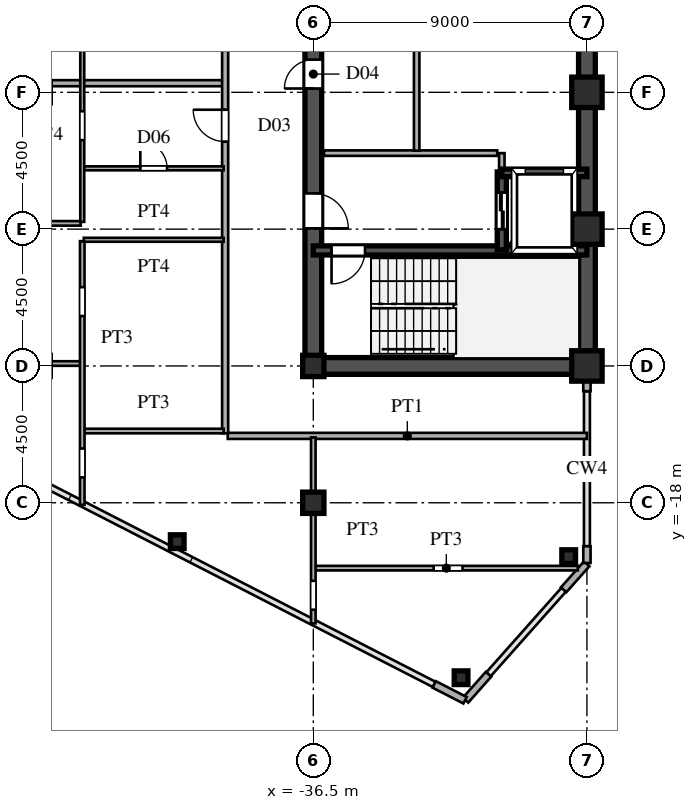
"""IFC4 building model, lengths in metres.
Left out: names, types, materials, properties, quantities, classifications, styles, units other than length and angle.
Written with IfcOpenShell. Run it as: python <this file> out.ifc"""

import sys

from ifc_helpers import new_model, si_unit, direction, frame, frame_2d, origin, origin_2d, place, context, subcontext, project, spatial, rectangle, hollow_rectangle, i_section, extrude, source, transform, mapped, element, fill, save


model = new_model("IFC4")
c1 = context("Model", 3, precision=1e-05, world=origin(), true_north=direction((0.0, 1.0)))
c2 = subcontext(c1, "Body", "Model", "MODEL_VIEW")
j1 = project(units=[si_unit("LENGTHUNIT", "METRE"), si_unit("PLANEANGLEUNIT", "RADIAN")], contexts=[c1])
p1 = place(None, origin())
s1 = spatial("IfcSite", under=j1, at=p1, CompositionType="ELEMENT")
p2 = place(p1, origin())
s2 = spatial("IfcBuilding", under=s1, at=p2, CompositionType="ELEMENT")
p3 = place(p2, frame((0.0, 0.0, 154.8)))
s3 = spatial("IfcBuildingStorey", under=s2, at=p3, CompositionType="ELEMENT", Elevation=154.8)
m1 = source(origin(), c2, "Body", "SweptSolid", [
    extrude(hollow_rectangle(XDim=1.0, YDim=1.0, WallThickness=0.042, at=origin_2d()), origin(), (0.0, 0.0, 1.0), 3.6),
])
for number, where, z_axis, x_axis in (
    (1, (-27.5, -13.5, 0.0), (0.0, 0.0, 1.0), (1.0, 0.0, 0.0)),
    (2, (-27.5, -9.0, 0.0), (0.0, 0.0, 1.0), (1.0, 0.0, 0.0)),
    (3, (-27.5, -4.5, 0.0), (0.0, 0.0, 1.0), (1.0, 0.0, 0.0)),
):
    element("IfcColumn", number, at=place(p3, frame(where, z_axis=z_axis, x_axis=x_axis)), inside=s3, PredefinedType="COLUMN", context=c2, shape_type="MappedRepresentation", body=[
        mapped(m1, transform((0.0, 0.0, 0.0), scale=1.0)),
    ])
m2 = source(origin(), c2, "Body", "SweptSolid", [
    extrude(i_section(OverallWidth=0.7, OverallDepth=0.7, WebThickness=0.028, FlangeThickness=0.045, at=origin_2d()), origin(), (0.0, 0.0, 1.0), 3.6),
])
for number, where, z_axis, x_axis in (
    (4, (-36.5, -18.0, 0.0), (0.0, 0.0, 1.0), (1.0, 0.0, 0.0)),
    (5, (-36.5, -13.5, 0.0), (0.0, 0.0, 1.0), (1.0, 0.0, 0.0)),
):
    element("IfcColumn", number, at=place(p3, frame(where, z_axis=z_axis, x_axis=x_axis)), inside=s3, PredefinedType="COLUMN", context=c2, shape_type="MappedRepresentation", body=[
        mapped(m2, transform((0.0, 0.0, 0.0), scale=1.0)),
    ])
m3 = source(origin(), c2, "Body", "SweptSolid", [
    extrude(hollow_rectangle(XDim=0.45, YDim=0.45, WallThickness=0.018, at=origin_2d()), origin(), (0.0, 0.0, 1.0), 3.6),
])
for number, where, z_axis, x_axis in (
    (6, (-28.1, -19.772, 0.0), (0.0, 0.0, 1.0), (1.0, 0.0, 0.0)),
    (7, (-31.64, -23.754, 0.0), (0.0, 0.0, 1.0), (1.0, 0.0, 0.0)),
    (8, (-40.976, -19.278, 0.0), (0.0, 0.0, 1.0), (1.0, 0.0, 0.0)),
):
    element("IfcColumn", number, at=place(p3, frame(where, z_axis=z_axis, x_axis=x_axis)), inside=s3, PredefinedType="COLUMN", context=c2, shape_type="MappedRepresentation", body=[
        mapped(m3, transform((0.0, 0.0, 0.0), scale=1.0)),
    ])
p4 = place(p3, frame((-27.5, -19.98, 0.0), z_axis=(0.0, 0.0, 1.0), x_axis=(0.0, 1.0, 0.0)))
e9 = element("IfcWall", 9, at=p4, inside=s3, PredefinedType="SOLIDWALL", context=c2, shape_type="SweptSolid", body=[
    extrude(rectangle(XDim=0.55, YDim=0.24, at=frame_2d((0.275, 0.0))), origin(), (0.0, 0.0, 1.0), 3.38),
])
p5 = place(p3, frame((-27.5, -14.33, 0.0), z_axis=(0.0, 0.0, 1.0), x_axis=(0.0, 1.0, 0.0)))
e10 = element("IfcWall", 10, at=p5, inside=s3, PredefinedType="SOLIDWALL", context=c2, shape_type="SweptSolid", body=[
    extrude(rectangle(XDim=0.55, YDim=0.24, at=frame_2d((0.275, 0.0))), origin(), (0.0, 0.0, 1.0), 1.88),
])
p6 = place(p3, frame((-32.523, -23.975, 0.0), z_axis=(0.0, 0.0, 1.0), x_axis=(0.889797395748, -0.456355776255, 0.0)))
e11 = element("IfcWall", 11, at=p6, inside=s3, PredefinedType="SOLIDWALL", context=c2, shape_type="SweptSolid", body=[
    extrude(rectangle(XDim=1.14, YDim=0.24, at=frame_2d((0.57, 0.0))), origin(), (0.0, 0.0, 1.0), 3.38),
])
for number, where, z_axis, x_axis in (
    (12, (-31.493, -24.492, 0.0), (0.0, 0.0, 1.0), (0.664, 0.747, 0.0)),
    (13, (-28.264, -20.86, 0.0), (0.0, 0.0, 1.0), (0.664, 0.747, 0.0)),
):
    element("IfcWall", number, at=place(p3, frame(where, z_axis=z_axis, x_axis=x_axis)), inside=s3, PredefinedType="SOLIDWALL", context=c2, shape_type="SweptSolid", body=[
        extrude(rectangle(XDim=1.14, YDim=0.24, at=frame_2d((0.57, 0.0))), origin(), (0.0, 0.0, 1.0), 3.38),
    ])
p7 = place(p3, frame((-27.5, -13.5, 0.0), z_axis=(0.0, 0.0, 1.0), x_axis=(0.0, 1.0, 0.0)))
e14 = element("IfcWall", 14, at=p7, inside=s3, PredefinedType="SHEAR", context=c2, shape_type="SweptSolid", body=[
    extrude(rectangle(XDim=12.2, YDim=0.55, at=frame_2d((6.1, 0.0))), origin(), (0.0, 0.0, 1.0), 3.38),
])
p8 = place(p3, frame((-36.5, -13.5, 0.0), z_axis=(0.0, 0.0, 1.0), x_axis=(1.0, 0.0, 0.0)))
e15 = element("IfcWall", 15, at=p8, inside=s3, PredefinedType="SHEAR", context=c2, shape_type="SweptSolid", body=[
    extrude(rectangle(XDim=9.0, YDim=0.55, at=frame_2d((4.5, 0.0))), origin(), (0.0, 0.0, 1.0), 3.38),
])
p9 = place(p3, frame((-36.5, -13.65, 0.0), z_axis=(0.0, 0.0, 1.0), x_axis=(0.0, 1.0, 0.0)))
e16 = element("IfcWall", 16, at=p9, inside=s3, PredefinedType="SHEAR", context=c2, shape_type="SweptSolid", body=[
    extrude(rectangle(XDim=7.15, YDim=0.55, at=frame_2d((3.575, 0.0))), origin(), (0.0, 0.0, 1.0), 3.38),
])
p10 = place(p9, frame((4.675, 0.0, 0.0)))
e17 = element("IfcOpeningElement", 17, at=p10, cuts=e16, PredefinedType="OPENING", context=c2, shape_type="SweptSolid", body=[
    extrude(rectangle(XDim=1.15, YDim=2.2, at=frame_2d((0.575, 1.1))), frame((0.0, 0.285, 0.0), z_axis=(0.0, -1.0, 0.0), x_axis=(1.0, 0.0, 0.0)), (0.0, 0.0, 1.0), 0.57),
])
p11 = place(p3, frame((-36.5, -6.5, 0.0), z_axis=(0.0, 0.0, 1.0), x_axis=(0.0, 1.0, 0.0)))
e18 = element("IfcWall", 18, at=p11, inside=s3, PredefinedType="SHEAR", context=c2, shape_type="SweptSolid", body=[
    extrude(rectangle(XDim=5.2, YDim=0.55, at=frame_2d((2.6, 0.0))), origin(), (0.0, 0.0, 1.0), 3.38),
])
p12 = place(p11, frame((2.125, 0.0, 0.0)))
e19 = element("IfcOpeningElement", 19, at=p12, cuts=e18, PredefinedType="OPENING", context=c2, shape_type="SweptSolid", body=[
    extrude(rectangle(XDim=0.95, YDim=2.15, at=frame_2d((0.475, 1.075))), frame((0.0, 0.285, 0.0), z_axis=(0.0, -1.0, 0.0), x_axis=(1.0, 0.0, 0.0)), (0.0, 0.0, 1.0), 0.57),
])
p13 = place(p3, frame((-36.5, -9.7, 0.0), z_axis=(0.0, 0.0, 1.0), x_axis=(1.0, 0.0, 0.0)))
e20 = element("IfcWall", 20, at=p13, inside=s3, PredefinedType="SHEAR", context=c2, shape_type="SweptSolid", body=[
    extrude(rectangle(XDim=9.0, YDim=0.3, at=frame_2d((4.5, 0.0))), origin(), (0.0, 0.0, 1.0), 3.38),
])
p14 = place(p13, frame((0.6, 0.0, 0.0)))
e21 = element("IfcOpeningElement", 21, at=p14, cuts=e20, PredefinedType="OPENING", context=c2, shape_type="SweptSolid", body=[
    extrude(rectangle(XDim=1.1, YDim=2.2, at=frame_2d((0.55, 1.1))), frame((0.0, 0.16, 0.0), z_axis=(0.0, -1.0, 0.0), x_axis=(1.0, 0.0, 0.0)), (0.0, 0.0, 1.0), 0.32),
])
p15 = place(p3, frame((-30.3, -7.15, 0.0), z_axis=(0.0, 0.0, 1.0), x_axis=(1.0, 0.0, 0.0)))
e22 = element("IfcWall", 22, at=p15, inside=s3, PredefinedType="SHEAR", context=c2, shape_type="SweptSolid", body=[
    extrude(rectangle(XDim=2.8, YDim=0.25, at=frame_2d((1.4, 0.0))), origin(), (0.0, 0.0, 1.0), 3.38),
])
p16 = place(p3, frame((-30.3, -9.68, 0.0), z_axis=(0.0, 0.0, 1.0), x_axis=(0.0, 1.0, 0.0)))
e23 = element("IfcWall", 23, at=p16, inside=s3, PredefinedType="SHEAR", context=c2, shape_type="SweptSolid", body=[
    extrude(rectangle(XDim=2.56, YDim=0.3, at=frame_2d((1.28, 0.0))), origin(), (0.0, 0.0, 1.0), 3.38),
])
p17 = place(p16, frame((0.68, 0.0, 0.0)))
e24 = element("IfcOpeningElement", 24, at=p17, cuts=e23, PredefinedType="OPENING", context=c2, shape_type="SweptSolid", body=[
    extrude(rectangle(XDim=1.2, YDim=2.25, at=frame_2d((0.6, 1.125))), frame((0.0, 0.16, 0.0), z_axis=(0.0, -1.0, 0.0), x_axis=(1.0, 0.0, 0.0)), (0.0, 0.0, 1.0), 0.32),
])
p18 = place(p3, frame((-36.15, -6.5, 0.0), z_axis=(0.0, 0.0, 1.0), x_axis=(1.0, 0.0, 0.0)))
e25 = element("IfcWall", 25, at=p18, inside=s3, PredefinedType="PARTITIONING", context=c2, shape_type="SweptSolid", body=[
    extrude(rectangle(XDim=5.7, YDim=0.18, at=frame_2d((2.85, 0.0))), origin(), (0.0, 0.0, 1.0), 3.38),
])
p19 = place(p3, frame((-30.3, -7.12, 0.0), z_axis=(0.0, 0.0, 1.0), x_axis=(0.0, 1.0, 0.0)))
e26 = element("IfcWall", 26, at=p19, inside=s3, PredefinedType="PARTITIONING", context=c2, shape_type="SweptSolid", body=[
    extrude(rectangle(XDim=0.62, YDim=0.18, at=frame_2d((0.31, 0.0))), origin(), (0.0, 0.0, 1.0), 3.38),
])
p20 = place(p3, frame((-33.1, -6.42, 0.0), z_axis=(0.0, 0.0, 1.0), x_axis=(0.0, 1.0, 0.0)))
e27 = element("IfcWall", 27, at=p20, inside=s3, PredefinedType="PARTITIONING", context=c2, shape_type="SweptSolid", body=[
    extrude(rectangle(XDim=5.04, YDim=0.18, at=frame_2d((2.52, 0.0))), origin(), (0.0, 0.0, 1.0), 3.38),
])
p21 = place(p3, frame((-36.45, -20.15, 0.0), z_axis=(0.0, 0.0, 1.0), x_axis=(1.0, 0.0, 0.0)))
e28 = element("IfcWall", 28, at=p21, inside=s3, PredefinedType="PARTITIONING", context=c2, shape_type="SweptSolid", body=[
    extrude(rectangle(XDim=8.649, YDim=0.15, at=frame_2d((4.325, 0.0))), origin(), (0.0, 0.0, 1.0), 3.38),
])
p22 = place(p21, frame((3.908, 0.0, 0.0)))
e29 = element("IfcOpeningElement", 29, at=p22, cuts=e28, PredefinedType="OPENING", context=c2, shape_type="SweptSolid", body=[
    extrude(rectangle(XDim=0.95, YDim=2.15, at=frame_2d((0.475, 1.075))), frame((0.0, 0.085, 0.0), z_axis=(0.0, -1.0, 0.0), x_axis=(1.0, 0.0, 0.0)), (0.0, 0.0, 1.0), 0.17),
])
p23 = place(p3, frame((-39.315, -15.8, 0.0), z_axis=(0.0, 0.0, 1.0), x_axis=(1.0, 0.0, 0.0)))
e30 = element("IfcWall", 30, at=p23, inside=s3, PredefinedType="PARTITIONING", context=c2, shape_type="SweptSolid", body=[
    extrude(rectangle(XDim=11.815, YDim=0.2, at=frame_2d((5.907, 0.0))), origin(), (0.0, 0.0, 1.0), 3.38),
])
p24 = place(p3, frame((-44.05, -15.64, 0.0), z_axis=(0.0, 0.0, 1.0), x_axis=(1.0, 0.0, 0.0)))
e31 = element("IfcWall", 31, at=p24, inside=s3, PredefinedType="PARTITIONING", context=c2, shape_type="SweptSolid", body=[
    extrude(rectangle(XDim=4.6, YDim=0.15, at=frame_2d((2.3, 0.0))), origin(), (0.0, 0.0, 1.0), 3.38),
])
p25 = place(p3, frame((-45.465, -13.42, 0.0), z_axis=(0.0, 0.0, 1.0), x_axis=(1.0, 0.0, 0.0)))
e32 = element("IfcWall", 32, at=p25, inside=s3, PredefinedType="PARTITIONING", context=c2, shape_type="SweptSolid", body=[
    extrude(rectangle(XDim=1.315, YDim=0.15, at=frame_2d((0.658, 0.0))), origin(), (0.0, 0.0, 1.0), 2.78),
])
p26 = place(p3, frame((-44.05, -9.35, 0.0), z_axis=(0.0, 0.0, 1.0), x_axis=(1.0, 0.0, 0.0)))
e33 = element("IfcWall", 33, at=p26, inside=s3, PredefinedType="PARTITIONING", context=c2, shape_type="SweptSolid", body=[
    extrude(rectangle(XDim=4.6, YDim=0.13, at=frame_2d((2.3, 0.0))), origin(), (0.0, 0.0, 1.0), 3.38),
])
p27 = place(p3, frame((-62.108, -8.81, 0.0), z_axis=(0.0, 0.0, 1.0), x_axis=(1.0, 0.0, 0.0)))
e34 = element("IfcWall", 34, at=p27, inside=s3, PredefinedType="PARTITIONING", context=c2, shape_type="SweptSolid", body=[
    extrude(rectangle(XDim=17.958, YDim=0.15, at=frame_2d((8.979, 0.0))), origin(), (0.0, 0.0, 1.0), 3.38),
])
p28 = place(p27, frame((12.333, 0.0, 0.0)))
e35 = element("IfcOpeningElement", 35, at=p28, cuts=e34, PredefinedType="OPENING", context=c2, shape_type="SweptSolid", body=[
    extrude(rectangle(XDim=0.95, YDim=2.15, at=frame_2d((0.475, 1.075))), frame((0.0, 0.085, 0.0), z_axis=(0.0, -1.0, 0.0), x_axis=(1.0, 0.0, 0.0)), (0.0, 0.0, 1.0), 0.17),
])
p29 = place(p3, frame((-44.05, -7.0, 0.0), z_axis=(0.0, 0.0, 1.0), x_axis=(1.0, 0.0, 0.0)))
e36 = element("IfcWall", 36, at=p29, inside=s3, PredefinedType="PARTITIONING", context=c2, shape_type="SweptSolid", body=[
    extrude(rectangle(XDim=4.6, YDim=0.13, at=frame_2d((2.3, 0.0))), origin(), (0.0, 0.0, 1.0), 3.38),
])
p30 = place(p29, frame((1.86, 0.0, 0.0)))
e37 = element("IfcOpeningElement", 37, at=p30, cuts=e36, PredefinedType="OPENING", context=c2, shape_type="SweptSolid", body=[
    extrude(rectangle(XDim=0.88, YDim=2.1, at=frame_2d((0.44, 1.05))), frame((0.0, 0.075, 0.0), z_axis=(0.0, -1.0, 0.0), x_axis=(1.0, 0.0, 0.0)), (0.0, 0.0, 1.0), 0.15),
])
p31 = place(p3, frame((-69.375, -4.2, 0.0), z_axis=(0.0, 0.0, 1.0), x_axis=(1.0, 0.0, 0.0)))
e38 = element("IfcWall", 38, at=p31, inside=s3, PredefinedType="PARTITIONING", context=c2, shape_type="SweptSolid", body=[
    extrude(rectangle(XDim=29.895, YDim=0.2, at=frame_2d((14.948, 0.0))), origin(), (0.0, 0.0, 1.0), 3.38),
])
p32 = place(p3, frame((-44.1, -18.069, 0.0), z_axis=(0.0, 0.0, 1.0), x_axis=(0.0, 1.0, 0.0)))
e39 = element("IfcWall", 39, at=p32, inside=s3, PredefinedType="PARTITIONING", context=c2, shape_type="SweptSolid", body=[
    extrude(rectangle(XDim=8.674, YDim=0.15, at=frame_2d((4.337, 0.0))), origin(), (0.0, 0.0, 1.0), 3.38),
])
p33 = place(p32, frame((6.21, 0.0, 0.0)))
e40 = element("IfcOpeningElement", 40, at=p33, cuts=e39, PredefinedType="OPENING", context=c2, shape_type="SweptSolid", body=[
    extrude(rectangle(XDim=0.95, YDim=2.15, at=frame_2d((0.475, 1.075))), frame((0.0, 0.085, 0.0), z_axis=(0.0, -1.0, 0.0), x_axis=(1.0, 0.0, 0.0)), (0.0, 0.0, 1.0), 0.17),
])
p34 = place(p32, frame((0.904, 0.0, 0.0)))
e41 = element("IfcOpeningElement", 41, at=p34, cuts=e39, PredefinedType="OPENING", context=c2, shape_type="SweptSolid", body=[
    extrude(rectangle(XDim=0.95, YDim=2.15, at=frame_2d((0.475, 1.075))), frame((0.0, 0.085, 0.0), z_axis=(0.0, -1.0, 0.0), x_axis=(1.0, 0.0, 0.0)), (0.0, 0.0, 1.0), 0.17),
])
p35 = place(p3, frame((-44.1, -8.761, 0.0), z_axis=(0.0, 0.0, 1.0), x_axis=(0.0, 1.0, 0.0)))
e42 = element("IfcWall", 42, at=p35, inside=s3, PredefinedType="PARTITIONING", context=c2, shape_type="SweptSolid", body=[
    extrude(rectangle(XDim=8.019, YDim=0.13, at=frame_2d((4.01, 0.0))), origin(), (0.0, 0.0, 1.0), 3.38),
])
p36 = place(p35, frame((2.688, 0.0, 0.0)))
e43 = element("IfcOpeningElement", 43, at=p36, cuts=e42, PredefinedType="OPENING", context=c2, shape_type="SweptSolid", body=[
    extrude(rectangle(XDim=0.95, YDim=2.15, at=frame_2d((0.475, 1.075))), frame((0.0, 0.075, 0.0), z_axis=(0.0, -1.0, 0.0), x_axis=(1.0, 0.0, 0.0)), (0.0, 0.0, 1.0), 0.15),
])
p37 = place(p3, frame((-39.4, -15.715, 0.0), z_axis=(0.0, 0.0, 1.0), x_axis=(0.0, 1.0, 0.0)))
e44 = element("IfcWall", 44, at=p37, inside=s3, PredefinedType="PARTITIONING", context=c2, shape_type="SweptSolid", body=[
    extrude(rectangle(XDim=31.43, YDim=0.2, at=frame_2d((15.715, 0.0))), origin(), (0.0, 0.0, 1.0), 3.38),
])
p38 = place(p37, frame((9.593, 0.0, 0.0)))
e45 = element("IfcOpeningElement", 45, at=p38, cuts=e44, PredefinedType="OPENING", context=c2, shape_type="SweptSolid", body=[
    extrude(rectangle(XDim=1.05, YDim=2.25, at=frame_2d((0.525, 1.125))), frame((0.0, 0.11, 0.0), z_axis=(0.0, -1.0, 0.0), x_axis=(1.0, 0.0, 0.0)), (0.0, 0.0, 1.0), 0.22),
])
p39 = place(p37, frame((17.295, 0.0, 0.0)))
e46 = element("IfcOpeningElement", 46, at=p39, cuts=e44, PredefinedType="OPENING", context=c2, shape_type="SweptSolid", body=[
    extrude(rectangle(XDim=1.05, YDim=2.25, at=frame_2d((0.525, 1.125))), frame((0.0, 0.11, 0.0), z_axis=(0.0, -1.0, 0.0), x_axis=(1.0, 0.0, 0.0)), (0.0, 0.0, 1.0), 0.22),
])
p40 = place(p37, frame((25.387, 0.0, 0.0)))
e47 = element("IfcOpeningElement", 47, at=p40, cuts=e44, PredefinedType="OPENING", context=c2, shape_type="SweptSolid", body=[
    extrude(rectangle(XDim=1.05, YDim=2.25, at=frame_2d((0.525, 1.125))), frame((0.0, 0.11, 0.0), z_axis=(0.0, -1.0, 0.0), x_axis=(1.0, 0.0, 0.0)), (0.0, 0.0, 1.0), 0.22),
])
p41 = place(p3, frame((-36.5, -21.969, 0.0), z_axis=(0.0, 0.0, 1.0), x_axis=(0.0, 1.0, 0.0)))
e48 = element("IfcWall", 48, at=p41, inside=s3, PredefinedType="PARTITIONING", context=c2, shape_type="SweptSolid", body=[
    extrude(rectangle(XDim=3.949, YDim=0.15, at=frame_2d((1.975, 0.0))), origin(), (0.0, 0.0, 1.0), 3.38),
])
p42 = place(p41, frame((0.452, 0.0, 0.0)))
e49 = element("IfcOpeningElement", 49, at=p42, cuts=e48, PredefinedType="OPENING", context=c2, shape_type="SweptSolid", body=[
    extrude(rectangle(XDim=0.95, YDim=2.15, at=frame_2d((0.475, 1.075))), frame((0.0, 0.085, 0.0), z_axis=(0.0, -1.0, 0.0), x_axis=(1.0, 0.0, 0.0)), (0.0, 0.0, 1.0), 0.17),
])
p43 = place(p3, frame((-36.5, -18.02, 0.0), z_axis=(0.0, 0.0, 1.0), x_axis=(0.0, 1.0, 0.0)))
e50 = element("IfcWall", 50, at=p43, inside=s3, PredefinedType="PARTITIONING", context=c2, shape_type="SweptSolid", body=[
    extrude(rectangle(XDim=2.17, YDim=0.15, at=frame_2d((1.085, 0.0))), origin(), (0.0, 0.0, 1.0), 1.38),
])
m4 = source(origin(), c2, "Body", "SweptSolid", [
    extrude(rectangle(XDim=1.15, YDim=2.2, at=frame_2d((0.575, 1.1))), frame((0.0, 0.025, 0.0), z_axis=(0.0, -1.0, 0.0), x_axis=(1.0, 0.0, 0.0)), (0.0, 0.0, 1.0), 0.05),
])
p44 = place(p10, frame((1.15, 0.0, 0.0), z_axis=(0.0, 0.0, 1.0), x_axis=(-1.0, 0.0, 0.0)))
e51 = element("IfcDoor", 51, at=p44, inside=s3, OperationType="SINGLE_SWING_LEFT", PredefinedType="DOOR", context=c2, shape_type="MappedRepresentation", body=[
    mapped(m4, transform((0.0, 0.0, 0.0), scale=1.0)),
])
fill(e17, e51)
m5 = source(origin(), c2, "Body", "SweptSolid", [
    extrude(rectangle(XDim=0.95, YDim=2.15, at=frame_2d((0.475, 1.075))), frame((0.0, 0.025, 0.0), z_axis=(0.0, -1.0, 0.0), x_axis=(1.0, 0.0, 0.0)), (0.0, 0.0, 1.0), 0.05),
])
p45 = place(p12, origin())
e52 = element("IfcDoor", 52, at=p45, inside=s3, OperationType="SINGLE_SWING_LEFT", PredefinedType="DOOR", context=c2, shape_type="MappedRepresentation", body=[
    mapped(m5, transform((0.0, 0.0, 0.0), scale=1.0)),
])
fill(e19, e52)
m6 = source(origin(), c2, "Body", "SweptSolid", [
    extrude(rectangle(XDim=1.1, YDim=2.2, at=frame_2d((0.55, 1.1))), frame((0.0, 0.025, 0.0), z_axis=(0.0, -1.0, 0.0), x_axis=(1.0, 0.0, 0.0)), (0.0, 0.0, 1.0), 0.05),
])
p46 = place(p14, frame((1.1, 0.0, 0.0), z_axis=(0.0, 0.0, 1.0), x_axis=(-1.0, 0.0, 0.0)))
e53 = element("IfcDoor", 53, at=p46, inside=s3, OperationType="SINGLE_SWING_LEFT", PredefinedType="DOOR", context=c2, shape_type="MappedRepresentation", body=[
    mapped(m6, transform((0.0, 0.0, 0.0), scale=1.0)),
])
fill(e21, e53)
m7 = source(origin(), c2, "Body", "SweptSolid", [
    extrude(rectangle(XDim=1.2, YDim=2.25, at=frame_2d((0.6, 1.125))), frame((0.0, 0.025, 0.0), z_axis=(0.0, -1.0, 0.0), x_axis=(1.0, 0.0, 0.0)), (0.0, 0.0, 1.0), 0.05),
])
p47 = place(p17, origin())
e54 = element("IfcDoor", 54, at=p47, inside=s3, OperationType="DOUBLE_DOOR_SLIDING", PredefinedType="DOOR", context=c2, shape_type="MappedRepresentation", body=[
    mapped(m7, transform((0.0, 0.0, 0.0), scale=1.0)),
])
fill(e24, e54)
m8 = source(origin(), c2, "Body", "SweptSolid", [
    extrude(rectangle(XDim=0.88, YDim=2.1, at=frame_2d((0.44, 1.05))), frame((0.0, 0.025, 0.0), z_axis=(0.0, -1.0, 0.0), x_axis=(1.0, 0.0, 0.0)), (0.0, 0.0, 1.0), 0.05),
])
p48 = place(p30, origin())
e55 = element("IfcDoor", 55, at=p48, inside=s3, OperationType="SINGLE_SWING_LEFT", PredefinedType="DOOR", context=c2, shape_type="MappedRepresentation", body=[
    mapped(m8, transform((0.0, 0.0, 0.0), scale=1.0)),
])
fill(e37, e55)
m9 = source(origin(), c2, "Body", "SweptSolid", [
    extrude(rectangle(XDim=1.05, YDim=2.25, at=frame_2d((0.525, 1.125))), frame((0.0, 0.025, 0.0), z_axis=(0.0, -1.0, 0.0), x_axis=(1.0, 0.0, 0.0)), (0.0, 0.0, 1.0), 0.05),
])
p49 = place(p38, origin())
e56 = element("IfcDoor", 56, at=p49, inside=s3, OperationType="SINGLE_SWING_RIGHT", PredefinedType="DOOR", context=c2, shape_type="MappedRepresentation", body=[
    mapped(m9, transform((0.0, 0.0, 0.0), scale=1.0)),
])
fill(e45, e56)
save(model, sys.argv[1])
